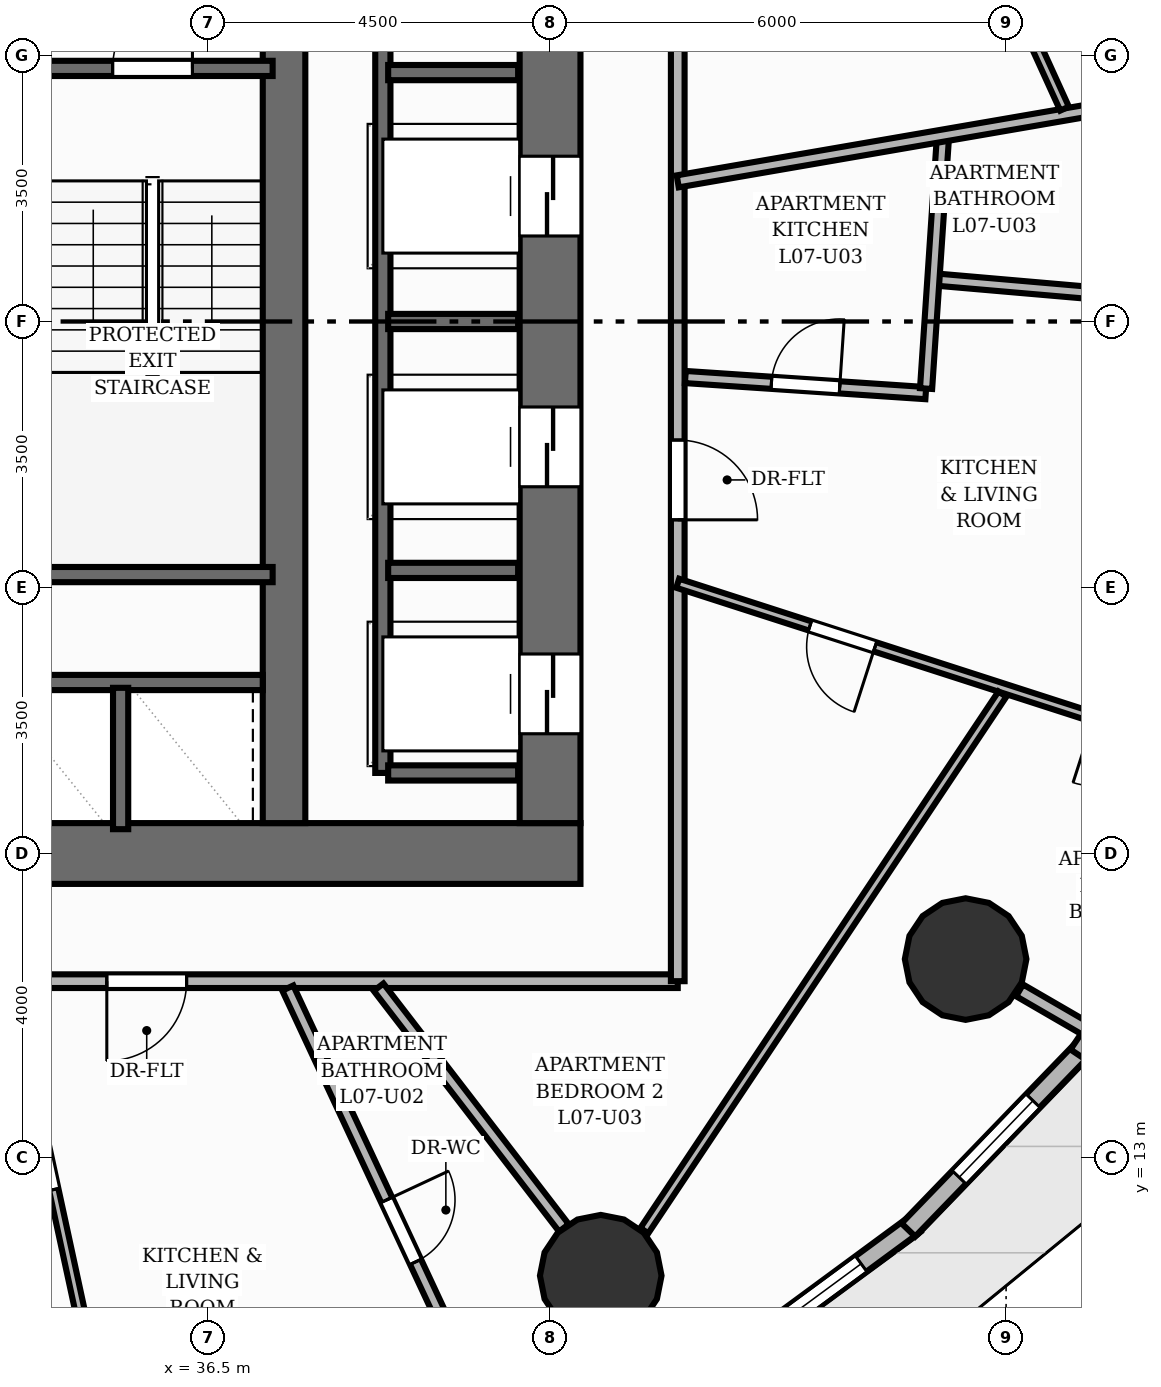
"""IFC4 building model, lengths in metres.
Left out: names, types, materials, properties, quantities, classifications, styles, units other than length and angle.
Written with IfcOpenShell. Run it as: python <this file> out.ifc"""

import sys

from ifc_helpers import new_model, si_unit, direction, frame, frame_2d, origin, origin_2d, place, context, subcontext, project, spatial, rectangle, circle, extrude, element, fill, save


model = new_model("IFC4")
c1 = context("Model", 3, precision=1e-05, world=origin(), true_north=direction((0.0, 1.0)))
c2 = subcontext(c1, "Body", "Model", "MODEL_VIEW")
j1 = project(units=[si_unit("LENGTHUNIT", "METRE"), si_unit("PLANEANGLEUNIT", "RADIAN")], contexts=[c1])
p1 = place(None, origin())
s1 = spatial("IfcSite", under=j1, at=p1, CompositionType="ELEMENT")
p2 = place(p1, origin())
s2 = spatial("IfcBuilding", under=s1, at=p2, CompositionType="ELEMENT")
p3 = place(p2, frame((0.0, 0.0, 28.0)))
s3 = spatial("IfcBuildingStorey", under=s2, at=p3, CompositionType="ELEMENT", Elevation=28.0)
p4 = place(p3, frame((22.6, 17.0, 0.0), z_axis=(0.0, 0.0, 1.0), x_axis=(1.0, 0.0, 0.0)))
e1 = element("IfcWall", 1, at=p4, inside=s3, PredefinedType="SHEAR", context=c2, shape_type="SweptSolid", body=[
    extrude(rectangle(XDim=18.8, YDim=0.8, at=frame_2d((9.4, 0.0))), origin(), (0.0, 0.0, 1.0), 3.2),
])
p5 = place(p4, frame((5.9, 0.0, 0.0)))
e2 = element("IfcOpeningElement", 2, at=p5, cuts=e1, PredefinedType="OPENING", context=c2, shape_type="SweptSolid", body=[
    extrude(rectangle(XDim=1.1, YDim=2.15, at=frame_2d((0.55, 1.075))), frame((0.0, 0.41, 0.0), z_axis=(0.0, -1.0, 0.0), x_axis=(1.0, 0.0, 0.0)), (0.0, 0.0, 1.0), 0.82),
])
p6 = place(p4, frame((9.45, 0.0, 0.0)))
e3 = element("IfcOpeningElement", 3, at=p6, cuts=e1, PredefinedType="OPENING", context=c2, shape_type="SweptSolid", body=[
    extrude(rectangle(XDim=0.9, YDim=2.1, at=frame_2d((0.45, 1.05))), frame((0.0, 0.41, 0.0), z_axis=(0.0, -1.0, 0.0), x_axis=(1.0, 0.0, 0.0)), (0.0, 0.0, 1.0), 0.82),
])
p7 = place(p3, frame((41.0, 17.4, 0.0), z_axis=(0.0, 0.0, 1.0), x_axis=(0.0, 1.0, 0.0)))
e4 = element("IfcWall", 4, at=p7, inside=s3, PredefinedType="SHEAR", context=c2, shape_type="SweptSolid", body=[
    extrude(rectangle(XDim=13.2, YDim=0.8, at=frame_2d((6.6, 0.0))), origin(), (0.0, 0.0, 1.0), 3.2),
])
p8 = place(p7, frame((1.175, 0.0, 0.0)))
e5 = element("IfcOpeningElement", 5, at=p8, cuts=e4, PredefinedType="OPENING", context=c2, shape_type="SweptSolid", body=[
    extrude(rectangle(XDim=1.05, YDim=2.15, at=frame_2d((0.525, 1.075))), frame((0.0, 0.41, 0.0), z_axis=(0.0, -1.0, 0.0), x_axis=(1.0, 0.0, 0.0)), (0.0, 0.0, 1.0), 0.82),
])
p9 = place(p7, frame((4.425, 0.0, 0.0)))
e6 = element("IfcOpeningElement", 6, at=p9, cuts=e4, PredefinedType="OPENING", context=c2, shape_type="SweptSolid", body=[
    extrude(rectangle(XDim=1.05, YDim=2.15, at=frame_2d((0.525, 1.075))), frame((0.0, 0.41, 0.0), z_axis=(0.0, -1.0, 0.0), x_axis=(1.0, 0.0, 0.0)), (0.0, 0.0, 1.0), 0.82),
])
p10 = place(p7, frame((7.725, 0.0, 0.0)))
e7 = element("IfcOpeningElement", 7, at=p10, cuts=e4, PredefinedType="OPENING", context=c2, shape_type="SweptSolid", body=[
    extrude(rectangle(XDim=1.05, YDim=2.15, at=frame_2d((0.525, 1.075))), frame((0.0, 0.41, 0.0), z_axis=(0.0, -1.0, 0.0), x_axis=(1.0, 0.0, 0.0)), (0.0, 0.0, 1.0), 0.82),
])
p11 = place(p7, frame((10.975, 0.0, 0.0)))
e8 = element("IfcOpeningElement", 8, at=p11, cuts=e4, PredefinedType="OPENING", context=c2, shape_type="SweptSolid", body=[
    extrude(rectangle(XDim=1.05, YDim=2.15, at=frame_2d((0.525, 1.075))), frame((0.0, 0.41, 0.0), z_axis=(0.0, -1.0, 0.0), x_axis=(1.0, 0.0, 0.0)), (0.0, 0.0, 1.0), 0.82),
])
p12 = place(p3, frame((37.5, 17.4, 0.0), z_axis=(0.0, 0.0, 1.0), x_axis=(0.0, 1.0, 0.0)))
e9 = element("IfcWall", 9, at=p12, inside=s3, PredefinedType="SHEAR", context=c2, shape_type="SweptSolid", body=[
    extrude(rectangle(XDim=13.2, YDim=0.56, at=frame_2d((6.6, 0.0))), origin(), (0.0, 0.0, 1.0), 3.2),
])
for number, where, z_axis, x_axis in (
    (10, (41.667, 11.445, 0.0), (0.0, 0.0, 1.0), (1.0, 0.0, 0.0)),
    (11, (46.468, 15.611, 0.0), (0.0, 0.0, 1.0), (1.0, 0.0, 0.0)),
):
    element("IfcColumn", number, at=place(p3, frame(where, z_axis=z_axis, x_axis=x_axis)), inside=s3, PredefinedType="COLUMN", context=c2, shape_type="SweptSolid", body=[
        extrude(circle(Radius=0.8, at=origin_2d()), origin(), (0.0, 0.0, 1.0), 3.2),
    ])
p13 = place(p3, frame((45.798, 12.12, 0.0), z_axis=(0.0, 0.0, 1.0), x_axis=(-0.805405938507, -0.592723606935, 0.0)))
e12 = element("IfcWall", 12, at=p13, inside=s3, PredefinedType="SOLIDWALL", context=c2, shape_type="SweptSolid", body=[
    extrude(rectangle(XDim=3.399, YDim=0.25, at=frame_2d((1.699, 0.0))), origin(), (0.0, 0.0, 1.0), 2.96),
])
p14 = place(p13, frame((0.875, 0.0, 0.85)))
e13 = element("IfcOpeningElement", 13, at=p14, cuts=e12, PredefinedType="OPENING", context=c2, shape_type="SweptSolid", body=[
    extrude(rectangle(XDim=1.65, YDim=1.55, at=frame_2d((0.825, 0.775))), frame((0.0, 0.135, 0.0), z_axis=(0.0, -1.0, 0.0), x_axis=(1.0, 0.0, 0.0)), (0.0, 0.0, 1.0), 0.27),
])
p15 = place(p3, frame((48.021, 14.438, 0.0), z_axis=(0.0, 0.0, 1.0), x_axis=(-0.694392538781, -0.719596416115, 0.0)))
e14 = element("IfcWall", 14, at=p15, inside=s3, PredefinedType="SOLIDWALL", context=c2, shape_type="SweptSolid", body=[
    extrude(rectangle(XDim=3.323, YDim=0.25, at=frame_2d((1.661, 0.0))), origin(), (0.0, 0.0, 1.0), 2.96),
])
p16 = place(p15, frame((0.961, 0.0, 0.85)))
e15 = element("IfcOpeningElement", 15, at=p16, cuts=e14, PredefinedType="OPENING", context=c2, shape_type="SweptSolid", body=[
    extrude(rectangle(XDim=1.4, YDim=1.55, at=frame_2d((0.7, 0.775))), frame((0.0, 0.135, 0.0), z_axis=(0.0, -1.0, 0.0), x_axis=(1.0, 0.0, 0.0)), (0.0, 0.0, 1.0), 0.27),
])
p17 = place(p3, frame((49.758, 17.047, 0.0), z_axis=(0.0, 0.0, 1.0), x_axis=(-0.556764929833, -0.83067009872, 0.0)))
e16 = element("IfcWall", 16, at=p17, inside=s3, PredefinedType="SOLIDWALL", context=c2, shape_type="SweptSolid", body=[
    extrude(rectangle(XDim=3.244, YDim=0.25, at=frame_2d((1.622, 0.0))), origin(), (0.0, 0.0, 1.0), 2.96),
])
p18 = place(p3, frame((34.11, 20.67, 0.0), z_axis=(0.0, 0.0, 1.0), x_axis=(1.0, 0.0, 0.0)))
e17 = element("IfcWall", 17, at=p18, inside=s3, PredefinedType="SHEAR", context=c2, shape_type="SweptSolid", body=[
    extrude(rectangle(XDim=3.24, YDim=0.2, at=frame_2d((1.62, 0.0))), origin(), (0.0, 0.0, 1.0), 3.2),
])
p19 = place(p3, frame((34.11, 27.33, 0.0), z_axis=(0.0, 0.0, 1.0), x_axis=(1.0, 0.0, 0.0)))
e18 = element("IfcWall", 18, at=p19, inside=s3, PredefinedType="SHEAR", context=c2, shape_type="SweptSolid", body=[
    extrude(rectangle(XDim=3.24, YDim=0.2, at=frame_2d((1.62, 0.0))), origin(), (0.0, 0.0, 1.0), 3.2),
])
p20 = place(p19, frame((1.135, 0.0, 0.0)))
e19 = element("IfcOpeningElement", 19, at=p20, cuts=e18, PredefinedType="OPENING", context=c2, shape_type="SweptSolid", body=[
    extrude(rectangle(XDim=1.05, YDim=2.15, at=frame_2d((0.525, 1.075))), frame((0.0, 0.11, 0.0), z_axis=(0.0, -1.0, 0.0), x_axis=(1.0, 0.0, 0.0)), (0.0, 0.0, 1.0), 0.22),
])
p21 = place(p3, frame((38.8, 18.06, 0.0), z_axis=(0.0, 0.0, 1.0), x_axis=(0.0, 1.0, 0.0)))
e20 = element("IfcWall", 20, at=p21, inside=s3, PredefinedType="SHEAR", context=c2, shape_type="SweptSolid", body=[
    extrude(rectangle(XDim=11.88, YDim=0.2, at=frame_2d((5.94, 0.0))), origin(), (0.0, 0.0, 1.0), 3.2),
])
for number, where, z_axis, x_axis in (
    (21, (38.87, 18.06, 0.0), (0.0, 0.0, 1.0), (1.0, 0.0, 0.0)),
    (22, (38.87, 20.725, 0.0), (0.0, 0.0, 1.0), (1.0, 0.0, 0.0)),
    (23, (38.87, 24.0, 0.0), (0.0, 0.0, 1.0), (1.0, 0.0, 0.0)),
    (24, (38.87, 27.275, 0.0), (0.0, 0.0, 1.0), (1.0, 0.0, 0.0)),
):
    element("IfcWall", number, at=place(p3, frame(where, z_axis=z_axis, x_axis=x_axis)), inside=s3, PredefinedType="SHEAR", context=c2, shape_type="SweptSolid", body=[
        extrude(rectangle(XDim=1.71, YDim=0.2, at=frame_2d((0.855, 0.0))), origin(), (0.0, 0.0, 1.0), 3.2),
    ])
p22 = place(p3, frame((33.5, 19.25, 0.0), z_axis=(0.0, 0.0, 1.0), x_axis=(1.0, 0.0, 0.0)))
e25 = element("IfcWall", 25, at=p22, inside=s3, PredefinedType="SHEAR", context=c2, shape_type="SweptSolid", body=[
    extrude(rectangle(XDim=3.72, YDim=0.2, at=frame_2d((1.86, 0.0))), origin(), (0.0, 0.0, 1.0), 3.2),
])
p23 = place(p3, frame((35.35, 17.32, 0.0), z_axis=(0.0, 0.0, 1.0), x_axis=(0.0, 1.0, 0.0)))
e26 = element("IfcWall", 26, at=p23, inside=s3, PredefinedType="SHEAR", context=c2, shape_type="SweptSolid", body=[
    extrude(rectangle(XDim=1.86, YDim=0.2, at=frame_2d((0.93, 0.0))), origin(), (0.0, 0.0, 1.0), 3.2),
])
p24 = place(p3, frame((47.177, 15.2, 0.0), z_axis=(0.0, 0.0, 1.0), x_axis=(0.865001274409, -0.501769663562, 0.0)))
e27 = element("IfcWall", 27, at=p24, inside=s3, PredefinedType="PARTITIONING", context=c2, shape_type="SweptSolid", body=[
    extrude(rectangle(XDim=1.063, YDim=0.18, at=frame_2d((0.531, 0.0))), origin(), (0.0, 0.0, 1.0), 2.178),
])
p25 = place(p3, frame((42.68, 15.32, 0.0), z_axis=(0.0, 0.0, 1.0), x_axis=(-1.0, 0.0, 0.0)))
e28 = element("IfcWall", 28, at=p25, inside=s3, PredefinedType="PARTITIONING", context=c2, shape_type="SweptSolid", body=[
    extrude(rectangle(XDim=8.823, YDim=0.18, at=frame_2d((4.411, 0.0))), origin(), (0.0, 0.0, 1.0), 2.955),
])
p26 = place(p25, frame((6.462, 0.0, 0.0)))
e29 = element("IfcOpeningElement", 29, at=p26, cuts=e28, PredefinedType="OPENING", context=c2, shape_type="SweptSolid", body=[
    extrude(rectangle(XDim=1.05, YDim=2.15, at=frame_2d((0.525, 1.075))), frame((0.0, 0.1, 0.0), z_axis=(0.0, -1.0, 0.0), x_axis=(1.0, 0.0, 0.0)), (0.0, 0.0, 1.0), 0.2),
])
p27 = place(p3, frame((42.68, 32.68, 0.0), z_axis=(0.0, 0.0, 1.0), x_axis=(0.0, -1.0, 0.0)))
e30 = element("IfcWall", 30, at=p27, inside=s3, PredefinedType="PARTITIONING", context=c2, shape_type="SweptSolid", body=[
    extrude(rectangle(XDim=17.36, YDim=0.18, at=frame_2d((8.68, 0.0))), origin(), (0.0, 0.0, 1.0), 2.955),
])
p28 = place(p27, frame((10.24, 0.0, 0.0)))
e31 = element("IfcOpeningElement", 31, at=p28, cuts=e30, PredefinedType="OPENING", context=c2, shape_type="SweptSolid", body=[
    extrude(rectangle(XDim=1.05, YDim=2.15, at=frame_2d((0.525, 1.075))), frame((0.0, 0.1, 0.0), z_axis=(0.0, -1.0, 0.0), x_axis=(1.0, 0.0, 0.0)), (0.0, 0.0, 1.0), 0.2),
])
p29 = place(p3, frame((37.55, 15.229, 0.0), z_axis=(0.0, 0.0, 1.0), x_axis=(0.422745211231, -0.906248578692, 0.0)))
e32 = element("IfcWall", 32, at=p29, inside=s3, PredefinedType="PLUMBINGWALL", context=c2, shape_type="SweptSolid", body=[
    extrude(rectangle(XDim=7.052, YDim=0.16, at=frame_2d((3.526, 0.0))), origin(), (0.0, 0.0, 1.0), 2.641),
])
p30 = place(p29, frame((3.076, 0.0, 0.0)))
e33 = element("IfcOpeningElement", 33, at=p30, cuts=e32, PredefinedType="OPENING", context=c2, shape_type="SweptSolid", body=[
    extrude(rectangle(XDim=0.9, YDim=2.1, at=frame_2d((0.45, 1.05))), frame((0.0, 0.09, 0.0), z_axis=(0.0, -1.0, 0.0), x_axis=(1.0, 0.0, 0.0)), (0.0, 0.0, 1.0), 0.18),
])
p31 = place(p3, frame((35.054, 9.879, 0.0), z_axis=(0.0, 0.0, 1.0), x_axis=(-0.211435796324, 0.977391888667, 0.0)))
e34 = element("IfcWall", 34, at=p31, inside=s3, PredefinedType="PARTITIONING", context=c2, shape_type="SweptSolid", body=[
    extrude(rectangle(XDim=5.447, YDim=0.125, at=frame_2d((2.723, 0.0))), origin(), (0.0, 0.0, 1.0), 2.178),
])
p32 = place(p31, frame((2.762, 0.0, 0.0)))
e35 = element("IfcOpeningElement", 35, at=p32, cuts=e34, PredefinedType="OPENING", context=c2, shape_type="SweptSolid", body=[
    extrude(rectangle(XDim=0.9, YDim=2.1, at=frame_2d((0.45, 1.05))), frame((0.0, 0.073, 0.0), z_axis=(0.0, -1.0, 0.0), x_axis=(1.0, 0.0, 0.0)), (0.0, 0.0, 1.0), 0.145),
])
p33 = place(p3, frame((38.744, 15.241, 0.0), z_axis=(0.0, 0.0, 1.0), x_axis=(0.610097434882, -0.792326397358, 0.0)))
e36 = element("IfcWall", 36, at=p33, inside=s3, PredefinedType="PLUMBINGWALL", context=c2, shape_type="SweptSolid", body=[
    extrude(rectangle(XDim=3.997, YDim=0.16, at=frame_2d((1.998, 0.0))), origin(), (0.0, 0.0, 1.0), 2.178),
])
p34 = place(p3, frame((46.044, 24.555, 0.0), z_axis=(0.0, 0.0, 1.0), x_axis=(0.996262385211, -0.086378584226, 0.0)))
e37 = element("IfcWall", 37, at=p34, inside=s3, PredefinedType="PLUMBINGWALL", context=c2, shape_type="SweptSolid", body=[
    extrude(rectangle(XDim=5.54, YDim=0.16, at=frame_2d((2.77, 0.0))), origin(), (0.0, 0.0, 1.0), 2.641),
])
p35 = place(p34, frame((2.32, 0.0, 0.0)))
e38 = element("IfcOpeningElement", 38, at=p35, cuts=e37, PredefinedType="OPENING", context=c2, shape_type="SweptSolid", body=[
    extrude(rectangle(XDim=0.9, YDim=2.1, at=frame_2d((0.45, 1.05))), frame((0.0, 0.09, 0.0), z_axis=(0.0, -1.0, 0.0), x_axis=(1.0, 0.0, 0.0)), (0.0, 0.0, 1.0), 0.18),
])
p36 = place(p3, frame((50.195, 18.132, 0.0), z_axis=(0.0, 0.0, 1.0), x_axis=(-0.951723769721, 0.306955804879, 0.0)))
e39 = element("IfcWall", 39, at=p36, inside=s3, PredefinedType="PARTITIONING", context=c2, shape_type="SweptSolid", body=[
    extrude(rectangle(XDim=7.896, YDim=0.125, at=frame_2d((3.948, 0.0))), origin(), (0.0, 0.0, 1.0), 2.955),
])
p37 = place(p36, frame((1.241, 0.0, 0.0)))
e40 = element("IfcOpeningElement", 40, at=p37, cuts=e39, PredefinedType="OPENING", context=c2, shape_type="SweptSolid", body=[
    extrude(rectangle(XDim=0.9, YDim=2.1, at=frame_2d((0.45, 1.05))), frame((0.0, 0.073, 0.0), z_axis=(0.0, -1.0, 0.0), x_axis=(1.0, 0.0, 0.0)), (0.0, 0.0, 1.0), 0.145),
])
p38 = place(p36, frame((5.169, 0.0, 0.0)))
e41 = element("IfcOpeningElement", 41, at=p38, cuts=e39, PredefinedType="OPENING", context=c2, shape_type="SweptSolid", body=[
    extrude(rectangle(XDim=0.9, YDim=2.1, at=frame_2d((0.45, 1.05))), frame((0.0, 0.073, 0.0), z_axis=(0.0, -1.0, 0.0), x_axis=(1.0, 0.0, 0.0)), (0.0, 0.0, 1.0), 0.145),
])
p39 = place(p3, frame((42.78, 23.269, 0.0), z_axis=(0.0, 0.0, 1.0), x_axis=(0.99776911562, -0.066759208461, 0.0)))
e42 = element("IfcWall", 42, at=p39, inside=s3, PredefinedType="PLUMBINGWALL", context=c2, shape_type="SweptSolid", body=[
    extrude(rectangle(XDim=3.171, YDim=0.16, at=frame_2d((1.585, 0.0))), origin(), (0.0, 0.0, 1.0), 2.641),
])
p40 = place(p39, frame((1.135, 0.0, 0.0)))
e43 = element("IfcOpeningElement", 43, at=p40, cuts=e42, PredefinedType="OPENING", context=c2, shape_type="SweptSolid", body=[
    extrude(rectangle(XDim=0.9, YDim=2.1, at=frame_2d((0.45, 1.05))), frame((0.0, 0.09, 0.0), z_axis=(0.0, -1.0, 0.0), x_axis=(1.0, 0.0, 0.0)), (0.0, 0.0, 1.0), 0.18),
])
p41 = place(p3, frame((45.947, 23.117, 0.0), z_axis=(0.0, 0.0, 1.0), x_axis=(0.066888153037, 0.997760479766, 0.0)))
e44 = element("IfcWall", 44, at=p41, inside=s3, PredefinedType="PLUMBINGWALL", context=c2, shape_type="SweptSolid", body=[
    extrude(rectangle(XDim=3.336, YDim=0.16, at=frame_2d((1.668, 0.0))), origin(), (0.0, 0.0, 1.0), 2.955),
])
p42 = place(p3, frame((42.68, 25.844, 0.0), z_axis=(0.0, 0.0, 1.0), x_axis=(0.985435597438, 0.170049061456, 0.0)))
e45 = element("IfcWall", 45, at=p42, inside=s3, PredefinedType="PLUMBINGWALL", context=c2, shape_type="SweptSolid", body=[
    extrude(rectangle(XDim=5.694, YDim=0.16, at=frame_2d((2.847, 0.0))), origin(), (0.0, 0.0, 1.0), 2.178),
])
p43 = place(p3, frame((42.24, 12.037, 0.0), z_axis=(0.0, 0.0, 1.0), x_axis=(0.55508513016, 0.831793543059, 0.0)))
e46 = element("IfcWall", 46, at=p43, inside=s3, PredefinedType="PARTITIONING", context=c2, shape_type="SweptSolid", body=[
    extrude(rectangle(XDim=8.488, YDim=0.125, at=frame_2d((4.244, 0.0))), origin(), (0.0, 0.0, 1.0), 2.328),
])
p44 = place(p3, frame((47.769, 26.801, 0.0), z_axis=(0.0, 0.0, 1.0), x_axis=(-0.414076998559, 0.910241857565, 0.0)))
e47 = element("IfcWall", 47, at=p44, inside=s3, PredefinedType="PARTITIONING", context=c2, shape_type="SweptSolid", body=[
    extrude(rectangle(XDim=8.658, YDim=0.125, at=frame_2d((4.329, 0.0))), origin(), (0.0, 0.0, 1.0), 2.328),
])
p45 = place(p14, origin())
e48 = element("IfcWindow", 48, at=p45, inside=s3, PartitioningType="SINGLE_PANEL", PredefinedType="WINDOW", context=c2, shape_type="SweptSolid", body=[
    extrude(rectangle(XDim=1.65, YDim=1.55, at=frame_2d((0.825, 0.775))), frame((0.0, 0.03, 0.0), z_axis=(0.0, -1.0, 0.0), x_axis=(1.0, 0.0, 0.0)), (0.0, 0.0, 1.0), 0.06),
])
fill(e13, e48)
p46 = place(p16, origin())
e49 = element("IfcWindow", 49, at=p46, inside=s3, PartitioningType="SINGLE_PANEL", PredefinedType="WINDOW", context=c2, shape_type="SweptSolid", body=[
    extrude(rectangle(XDim=1.4, YDim=1.55, at=frame_2d((0.7, 0.775))), frame((0.0, 0.03, 0.0), z_axis=(0.0, -1.0, 0.0), x_axis=(1.0, 0.0, 0.0)), (0.0, 0.0, 1.0), 0.06),
])
fill(e15, e49)
p47 = place(p20, origin())
e50 = element("IfcDoor", 50, at=p47, inside=s3, OperationType="SINGLE_SWING_RIGHT", PredefinedType="DOOR", context=c2, shape_type="SweptSolid", body=[
    extrude(rectangle(XDim=1.05, YDim=2.15, at=frame_2d((0.525, 1.075))), frame((0.0, 0.025, 0.0), z_axis=(0.0, -1.0, 0.0), x_axis=(1.0, 0.0, 0.0)), (0.0, 0.0, 1.0), 0.05),
])
fill(e19, e50)
p48 = place(p8, origin())
e51 = element("IfcDoor", 51, at=p48, inside=s3, OperationType="DOUBLE_DOOR_SLIDING", PredefinedType="DOOR", context=c2, shape_type="SweptSolid", body=[
    extrude(rectangle(XDim=1.05, YDim=2.15, at=frame_2d((0.525, 1.075))), frame((0.0, 0.025, 0.0), z_axis=(0.0, -1.0, 0.0), x_axis=(1.0, 0.0, 0.0)), (0.0, 0.0, 1.0), 0.05),
])
fill(e5, e51)
p49 = place(p9, origin())
e52 = element("IfcDoor", 52, at=p49, inside=s3, OperationType="DOUBLE_DOOR_SLIDING", PredefinedType="DOOR", context=c2, shape_type="SweptSolid", body=[
    extrude(rectangle(XDim=1.05, YDim=2.15, at=frame_2d((0.525, 1.075))), frame((0.0, 0.025, 0.0), z_axis=(0.0, -1.0, 0.0), x_axis=(1.0, 0.0, 0.0)), (0.0, 0.0, 1.0), 0.05),
])
fill(e6, e52)
p50 = place(p10, origin())
e53 = element("IfcDoor", 53, at=p50, inside=s3, OperationType="DOUBLE_DOOR_SLIDING", PredefinedType="DOOR", context=c2, shape_type="SweptSolid", body=[
    extrude(rectangle(XDim=1.05, YDim=2.15, at=frame_2d((0.525, 1.075))), frame((0.0, 0.025, 0.0), z_axis=(0.0, -1.0, 0.0), x_axis=(1.0, 0.0, 0.0)), (0.0, 0.0, 1.0), 0.05),
])
fill(e7, e53)
p51 = place(p26, origin())
e54 = element("IfcDoor", 54, at=p51, inside=s3, OperationType="SINGLE_SWING_RIGHT", PredefinedType="DOOR", context=c2, shape_type="SweptSolid", body=[
    extrude(rectangle(XDim=1.05, YDim=2.15, at=frame_2d((0.525, 1.075))), frame((0.0, 0.025, 0.0), z_axis=(0.0, -1.0, 0.0), x_axis=(1.0, 0.0, 0.0)), (0.0, 0.0, 1.0), 0.05),
])
fill(e29, e54)
p52 = place(p30, origin())
e55 = element("IfcDoor", 55, at=p52, inside=s3, OperationType="SINGLE_SWING_LEFT", PredefinedType="DOOR", context=c2, shape_type="SweptSolid", body=[
    extrude(rectangle(XDim=0.9, YDim=2.1, at=frame_2d((0.45, 1.05))), frame((0.0, 0.025, 0.0), z_axis=(0.0, -1.0, 0.0), x_axis=(1.0, 0.0, 0.0)), (0.0, 0.0, 1.0), 0.05),
])
fill(e33, e55)
p53 = place(p32, origin())
e56 = element("IfcDoor", 56, at=p53, inside=s3, OperationType="SINGLE_SWING_RIGHT", PredefinedType="DOOR", context=c2, shape_type="SweptSolid", body=[
    extrude(rectangle(XDim=0.9, YDim=2.1, at=frame_2d((0.45, 1.05))), frame((0.0, 0.025, 0.0), z_axis=(0.0, -1.0, 0.0), x_axis=(1.0, 0.0, 0.0)), (0.0, 0.0, 1.0), 0.05),
])
fill(e35, e56)
p54 = place(p28, origin())
e57 = element("IfcDoor", 57, at=p54, inside=s3, OperationType="SINGLE_SWING_RIGHT", PredefinedType="DOOR", context=c2, shape_type="SweptSolid", body=[
    extrude(rectangle(XDim=1.05, YDim=2.15, at=frame_2d((0.525, 1.075))), frame((0.0, 0.025, 0.0), z_axis=(0.0, -1.0, 0.0), x_axis=(1.0, 0.0, 0.0)), (0.0, 0.0, 1.0), 0.05),
])
fill(e31, e57)
p55 = place(p38, origin())
e58 = element("IfcDoor", 58, at=p55, inside=s3, OperationType="SINGLE_SWING_LEFT", PredefinedType="DOOR", context=c2, shape_type="SweptSolid", body=[
    extrude(rectangle(XDim=0.9, YDim=2.1, at=frame_2d((0.45, 1.05))), frame((0.0, 0.025, 0.0), z_axis=(0.0, -1.0, 0.0), x_axis=(1.0, 0.0, 0.0)), (0.0, 0.0, 1.0), 0.05),
])
fill(e41, e58)
p56 = place(p40, origin())
e59 = element("IfcDoor", 59, at=p56, inside=s3, OperationType="SINGLE_SWING_RIGHT", PredefinedType="DOOR", context=c2, shape_type="SweptSolid", body=[
    extrude(rectangle(XDim=0.9, YDim=2.1, at=frame_2d((0.45, 1.05))), frame((0.0, 0.025, 0.0), z_axis=(0.0, -1.0, 0.0), x_axis=(1.0, 0.0, 0.0)), (0.0, 0.0, 1.0), 0.05),
])
fill(e43, e59)
save(model, sys.argv[1])
